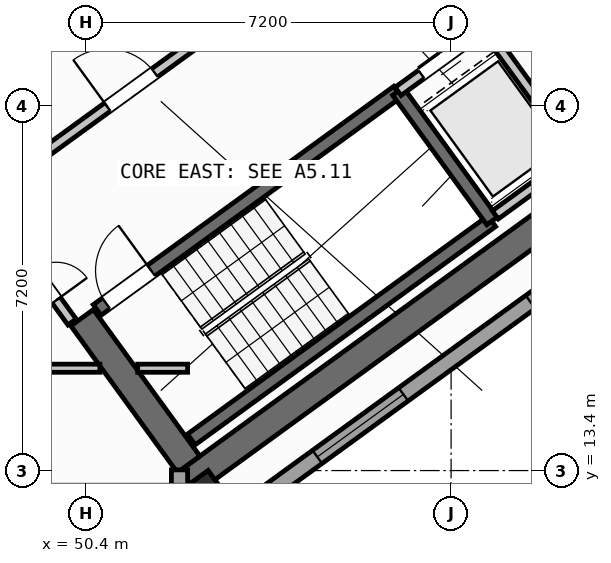
"""IFC4 building model, lengths in metres.
Left out: names, types, materials, properties, quantities, classifications, styles, units other than length and angle.
Written with IfcOpenShell. Run it as: python <this file> out.ifc"""

import sys

from ifc_helpers import new_model, si_unit, direction, frame, frame_2d, origin, origin_2d, place, context, subcontext, project, spatial, rectangle, hollow_rectangle, extrude, source, transform, mapped, element, fill, save


model = new_model("IFC4")
c1 = context("Model", 3, precision=1e-05, world=origin(), true_north=direction((0.0, 1.0)))
c2 = subcontext(c1, "Body", "Model", "MODEL_VIEW")
j1 = project(units=[si_unit("LENGTHUNIT", "METRE"), si_unit("PLANEANGLEUNIT", "RADIAN")], contexts=[c1])
p1 = place(None, origin())
s1 = spatial("IfcSite", under=j1, at=p1, CompositionType="ELEMENT")
p2 = place(p1, origin())
s2 = spatial("IfcBuilding", under=s1, at=p2, CompositionType="ELEMENT")
p3 = place(p2, frame((0.0, 0.0, 108.9)))
s3 = spatial("IfcBuildingStorey", under=s2, at=p3, CompositionType="ELEMENT", Elevation=108.9)
p4 = place(p3, frame((52.359, 13.14, 0.0), z_axis=(0.0, 0.0, 1.0), x_axis=(0.809014896919, 0.587788139183, 0.0)))
e1 = element("IfcWall", 1, at=p4, inside=s3, PredefinedType="SHEAR", context=c2, shape_type="SweptSolid", body=[
    extrude(rectangle(XDim=12.34, YDim=0.55, at=frame_2d((6.17, 0.0))), origin(), (0.0, 0.0, 1.0), 3.35),
])
p5 = place(p3, frame((52.42, 13.524, 0.0), z_axis=(0.0, 0.0, 1.0), x_axis=(-0.587802113096, 0.809004744015, 0.0)))
e2 = element("IfcWall", 2, at=p5, inside=s3, PredefinedType="SHEAR", context=c2, shape_type="SweptSolid", body=[
    extrude(rectangle(XDim=3.575, YDim=0.55, at=frame_2d((1.788, 0.0))), origin(), (0.0, 0.0, 1.0), 3.35),
])
m1 = source(origin(), c2, "Body", "SweptSolid", [
    extrude(hollow_rectangle(XDim=0.9, YDim=0.9, WallThickness=0.036, at=origin_2d()), origin(), (0.0, 0.0, 1.0), 3.6),
])
p6 = place(p3, frame((52.705, 12.773, 0.0), z_axis=(0.0, 0.0, 1.0), x_axis=(0.809016994375, 0.587785252292, 0.0)))
e3 = element("IfcColumn", 3, at=p6, inside=s3, PredefinedType="COLUMN", context=c2, shape_type="MappedRepresentation", body=[
    mapped(m1, transform((0.0, 0.0, 0.0), scale=1.0)),
])
p7 = place(p3, frame((67.454, 22.747, 0.0), z_axis=(0.0, 0.0, 1.0), x_axis=(-0.809021120468, -0.587779573171, 0.0)))
e4 = element("IfcWall", 4, at=p7, inside=s3, PredefinedType="STANDARD", context=c2, shape_type="SweptSolid", body=[
    extrude(rectangle(XDim=17.588, YDim=0.32, at=frame_2d((8.794, 0.0))), origin(), (0.0, 0.0, 1.0), 3.35),
])
p8 = place(p7, frame((1.624, 0.0, 0.0)))
e5 = element("IfcOpeningElement", 5, at=p8, cuts=e4, PredefinedType="OPENING", context=c2, shape_type="SweptSolid", body=[
    extrude(rectangle(XDim=1.05, YDim=2.15, at=frame_2d((0.525, 1.075))), frame((0.0, 0.17, 0.0), z_axis=(0.0, -1.0, 0.0), x_axis=(1.0, 0.0, 0.0)), (0.0, 0.0, 1.0), 0.34),
])
p9 = place(p7, frame((8.144, 0.0, 0.8)))
e6 = element("IfcOpeningElement", 6, at=p9, cuts=e4, PredefinedType="OPENING", context=c2, shape_type="SweptSolid", body=[
    extrude(rectangle(XDim=2.1, YDim=1.55, at=frame_2d((1.05, 0.775))), frame((0.0, 0.17, 0.0), z_axis=(0.0, -1.0, 0.0), x_axis=(1.0, 0.0, 0.0)), (0.0, 0.0, 1.0), 0.34),
])
p10 = place(p7, frame((13.344, 0.0, 0.8)))
e7 = element("IfcOpeningElement", 7, at=p10, cuts=e4, PredefinedType="OPENING", context=c2, shape_type="SweptSolid", body=[
    extrude(rectangle(XDim=2.1, YDim=1.55, at=frame_2d((1.05, 0.775))), frame((0.0, 0.17, 0.0), z_axis=(0.0, -1.0, 0.0), x_axis=(1.0, 0.0, 0.0)), (0.0, 0.0, 1.0), 0.34),
])
p11 = place(p3, frame((52.24, 13.414, 0.0), z_axis=(0.0, 0.0, 1.0), x_axis=(0.0, -1.0, 0.0)))
e8 = element("IfcWall", 8, at=p11, inside=s3, PredefinedType="STANDARD", context=c2, shape_type="SweptSolid", body=[
    extrude(rectangle(XDim=9.948, YDim=0.32, at=frame_2d((4.974, 0.0))), origin(), (0.0, 0.0, 1.0), 3.35),
])
p12 = place(p11, frame((2.31, 0.0, 0.8)))
e9 = element("IfcOpeningElement", 9, at=p12, cuts=e8, PredefinedType="OPENING", context=c2, shape_type="SweptSolid", body=[
    extrude(rectangle(XDim=2.1, YDim=1.55, at=frame_2d((1.05, 0.775))), frame((0.0, 0.17, 0.0), z_axis=(0.0, -1.0, 0.0), x_axis=(1.0, 0.0, 0.0)), (0.0, 0.0, 1.0), 0.34),
])
p13 = place(p11, frame((7.033, 0.0, 0.85)))
e10 = element("IfcOpeningElement", 10, at=p13, cuts=e8, PredefinedType="OPENING", context=c2, shape_type="SweptSolid", body=[
    extrude(rectangle(XDim=1.8, YDim=1.5, at=frame_2d((0.9, 0.75))), frame((0.0, 0.17, 0.0), z_axis=(0.0, -1.0, 0.0), x_axis=(1.0, 0.0, 0.0)), (0.0, 0.0, 1.0), 0.34),
])
p14 = place(p3, frame((52.472, 14.013, 0.0), z_axis=(0.0, 0.0, 1.0), x_axis=(0.809028366311, 0.587769599847, 0.0)))
e11 = element("IfcWall", 11, at=p14, inside=s3, PredefinedType="SHEAR", context=c2, shape_type="SweptSolid", body=[
    extrude(rectangle(XDim=7.33, YDim=0.26, at=frame_2d((3.665, 0.0))), origin(), (0.0, 0.0, 1.0), 3.35),
])
p15 = place(p3, frame((50.615, 16.57, 0.0), z_axis=(0.0, 0.0, 1.0), x_axis=(0.809028366311, 0.587769599847, 0.0)))
e12 = element("IfcWall", 12, at=p15, inside=s3, PredefinedType="SHEAR", context=c2, shape_type="SweptSolid", body=[
    extrude(rectangle(XDim=7.33, YDim=0.26, at=frame_2d((3.665, 0.0))), origin(), (0.0, 0.0, 1.0), 3.35),
])
p16 = place(p15, frame((0.22, 0.0, 0.0)))
e13 = element("IfcOpeningElement", 13, at=p16, cuts=e12, PredefinedType="OPENING", context=c2, shape_type="SweptSolid", body=[
    extrude(rectangle(XDim=1.1, YDim=2.1, at=frame_2d((0.55, 1.05))), frame((0.0, 0.14, 0.0), z_axis=(0.0, -1.0, 0.0), x_axis=(1.0, 0.0, 0.0)), (0.0, 0.0, 1.0), 0.28),
])
p17 = place(p3, frame((58.41, 18.327, 0.0), z_axis=(0.0, 0.0, 1.0), x_axis=(-0.58776738483, 0.809029975545, 0.0)))
e14 = element("IfcWall", 14, at=p17, inside=s3, PredefinedType="SHEAR", context=c2, shape_type="SweptSolid", body=[
    extrude(rectangle(XDim=3.16, YDim=0.26, at=frame_2d((1.58, 0.0))), origin(), (0.0, 0.0, 1.0), 3.35),
])
p18 = place(p3, frame((47.065, 21.407, 0.0), z_axis=(0.0, 0.0, 1.0), x_axis=(0.809032984992, 0.587763242466, 0.0)))
e15 = element("IfcWall", 15, at=p18, inside=s3, PredefinedType="STANDARD", context=c2, shape_type="SweptSolid", body=[
    extrude(rectangle(XDim=3.448, YDim=0.2, at=frame_2d((1.724, 0.0))), origin(), (0.0, 0.0, 1.0), 3.34),
])
p19 = place(p18, frame((0.458, 0.0, 0.0)))
e16 = element("IfcOpeningElement", 16, at=p19, cuts=e15, PredefinedType="OPENING", context=c2, shape_type="SweptSolid", body=[
    extrude(rectangle(XDim=1.3, YDim=2.2, at=frame_2d((0.65, 1.1))), frame((0.0, 0.11, 0.0), z_axis=(0.0, -1.0, 0.0), x_axis=(1.0, 0.0, 0.0)), (0.0, 0.0, 1.0), 0.22),
])
p20 = place(p3, frame((48.758, 19.077, 0.0), z_axis=(0.0, 0.0, 1.0), x_axis=(0.809005065155, 0.587801671104, 0.0)))
e17 = element("IfcWall", 17, at=p20, inside=s3, PredefinedType="STANDARD", context=c2, shape_type="SweptSolid", body=[
    extrude(rectangle(XDim=5.768, YDim=0.2, at=frame_2d((2.884, 0.0))), origin(), (0.0, 0.0, 1.0), 3.34),
])
p21 = place(p20, frame((2.548, 0.0, 0.0)))
e18 = element("IfcOpeningElement", 18, at=p21, cuts=e17, PredefinedType="OPENING", context=c2, shape_type="SweptSolid", body=[
    extrude(rectangle(XDim=1.15, YDim=2.1, at=frame_2d((0.575, 1.05))), frame((0.0, 0.11, 0.0), z_axis=(0.0, -1.0, 0.0), x_axis=(1.0, 0.0, 0.0)), (0.0, 0.0, 1.0), 0.22),
])
p22 = place(p3, frame((56.553, 20.884, 0.0), z_axis=(0.0, 0.0, 1.0), x_axis=(0.809023564264, 0.58777620951, 0.0)))
e19 = element("IfcWall", 19, at=p22, inside=s3, PredefinedType="STANDARD", context=c2, shape_type="SweptSolid", body=[
    extrude(rectangle(XDim=3.818, YDim=0.2, at=frame_2d((1.909, 0.0))), origin(), (0.0, 0.0, 1.0), 3.34),
])
p23 = place(p22, frame((0.57, 0.0, 0.0)))
e20 = element("IfcOpeningElement", 20, at=p23, cuts=e19, PredefinedType="OPENING", context=c2, shape_type="SweptSolid", body=[
    extrude(rectangle(XDim=1.1, YDim=2.15, at=frame_2d((0.55, 1.075))), frame((0.0, 0.11, 0.0), z_axis=(0.0, -1.0, 0.0), x_axis=(1.0, 0.0, 0.0)), (0.0, 0.0, 1.0), 0.22),
])
p24 = place(p22, frame((2.65, 0.0, 0.0)))
e21 = element("IfcOpeningElement", 21, at=p24, cuts=e19, PredefinedType="OPENING", context=c2, shape_type="SweptSolid", body=[
    extrude(rectangle(XDim=0.86, YDim=2.05, at=frame_2d((0.43, 1.025))), frame((0.0, 0.11, 0.0), z_axis=(0.0, -1.0, 0.0), x_axis=(1.0, 0.0, 0.0)), (0.0, 0.0, 1.0), 0.22),
])
p25 = place(p3, frame((60.067, 19.655, 0.0), z_axis=(0.0, 0.0, 1.0), x_axis=(-0.587800520745, 0.809005900975, 0.0)))
e22 = element("IfcWall", 22, at=p25, inside=s3, PredefinedType="STANDARD", context=c2, shape_type="SweptSolid", body=[
    extrude(rectangle(XDim=2.66, YDim=0.2, at=frame_2d((1.33, 0.0))), origin(), (0.0, 0.0, 1.0), 3.34),
])
p26 = place(p3, frame((58.472, 18.447, 0.0), z_axis=(0.0, 0.0, 1.0), x_axis=(0.809018631237, 0.587782999339, 0.0)))
e23 = element("IfcWall", 23, at=p26, inside=s3, PredefinedType="STANDARD", context=c2, shape_type="SweptSolid", body=[
    extrude(rectangle(XDim=3.698, YDim=0.2, at=frame_2d((1.849, 0.0))), origin(), (0.0, 0.0, 1.0), 3.34),
])
p27 = place(p3, frame((35.237, 15.42, 0.0), z_axis=(0.0, 0.0, 1.0), x_axis=(1.0, 0.0, 0.0)))
e24 = element("IfcWall", 24, at=p27, inside=s3, PredefinedType="PARTITIONING", context=c2, shape_type="SweptSolid", body=[
    extrude(rectangle(XDim=15.432, YDim=0.16, at=frame_2d((7.716, 0.0))), origin(), (0.0, 0.0, 1.0), 3.34),
])
p28 = place(p27, frame((0.969, 0.0, 0.0)))
e25 = element("IfcOpeningElement", 25, at=p28, cuts=e24, PredefinedType="OPENING", context=c2, shape_type="SweptSolid", body=[
    extrude(rectangle(XDim=1.0, YDim=2.1, at=frame_2d((0.5, 1.05))), frame((0.0, 0.09, 0.0), z_axis=(0.0, -1.0, 0.0), x_axis=(1.0, 0.0, 0.0)), (0.0, 0.0, 1.0), 0.18),
])
p29 = place(p27, frame((8.799, 0.0, 0.0)))
e26 = element("IfcOpeningElement", 26, at=p29, cuts=e24, PredefinedType="OPENING", context=c2, shape_type="SweptSolid", body=[
    extrude(rectangle(XDim=1.0, YDim=2.1, at=frame_2d((0.5, 1.05))), frame((0.0, 0.09, 0.0), z_axis=(0.0, -1.0, 0.0), x_axis=(1.0, 0.0, 0.0)), (0.0, 0.0, 1.0), 0.18),
])
p30 = place(p3, frame((51.416, 15.42, 0.0), z_axis=(0.0, 0.0, 1.0), x_axis=(1.0, 0.0, 0.0)))
e27 = element("IfcWall", 27, at=p30, inside=s3, PredefinedType="PARTITIONING", context=c2, shape_type="SweptSolid", body=[
    extrude(rectangle(XDim=0.984, YDim=0.16, at=frame_2d((0.492, 0.0))), origin(), (0.0, 0.0, 1.0), 3.34),
])
p31 = place(p3, frame((50.119, 16.333, 0.0), z_axis=(0.0, 0.0, 1.0), x_axis=(-0.587749856981, 0.809042709391, 0.0)))
e28 = element("IfcWall", 28, at=p31, inside=s3, PredefinedType="STANDARD", context=c2, shape_type="SweptSolid", body=[
    extrude(rectangle(XDim=2.96, YDim=0.2, at=frame_2d((1.48, 0.0))), origin(), (0.0, 0.0, 1.0), 3.34),
])
p32 = place(p31, frame((0.53, 0.0, 0.0)))
e29 = element("IfcOpeningElement", 29, at=p32, cuts=e28, PredefinedType="OPENING", context=c2, shape_type="SweptSolid", body=[
    extrude(rectangle(XDim=1.5, YDim=2.15, at=frame_2d((0.75, 1.075))), frame((0.0, 0.11, 0.0), z_axis=(0.0, -1.0, 0.0), x_axis=(1.0, 0.0, 0.0)), (0.0, 0.0, 1.0), 0.22),
])
m2 = source(origin(), c2, "Body", "SweptSolid", [
    extrude(rectangle(XDim=2.1, YDim=1.55, at=frame_2d((1.05, 0.775))), frame((0.0, 0.03, 0.0), z_axis=(0.0, -1.0, 0.0), x_axis=(1.0, 0.0, 0.0)), (0.0, 0.0, 1.0), 0.06),
])
p33 = place(p9, origin())
e30 = element("IfcWindow", 30, at=p33, inside=s3, PartitioningType="SINGLE_PANEL", PredefinedType="WINDOW", context=c2, shape_type="MappedRepresentation", body=[
    mapped(m2, transform((0.0, 0.0, 0.0), scale=1.0)),
])
fill(e6, e30)
p34 = place(p10, origin())
e31 = element("IfcWindow", 31, at=p34, inside=s3, PartitioningType="SINGLE_PANEL", PredefinedType="WINDOW", context=c2, shape_type="MappedRepresentation", body=[
    mapped(m2, transform((0.0, 0.0, 0.0), scale=1.0)),
])
fill(e7, e31)
m3 = source(origin(), c2, "Body", "SweptSolid", [
    extrude(rectangle(XDim=1.1, YDim=2.1, at=frame_2d((0.55, 1.05))), frame((0.0, 0.025, 0.0), z_axis=(0.0, -1.0, 0.0), x_axis=(1.0, 0.0, 0.0)), (0.0, 0.0, 1.0), 0.05),
])
p35 = place(p16, origin())
e32 = element("IfcDoor", 32, at=p35, inside=s3, OperationType="SINGLE_SWING_RIGHT", PredefinedType="DOOR", context=c2, shape_type="MappedRepresentation", body=[
    mapped(m3, transform((0.0, 0.0, 0.0), scale=1.0)),
])
fill(e13, e32)
m4 = source(origin(), c2, "Body", "SweptSolid", [
    extrude(rectangle(XDim=1.15, YDim=2.1, at=frame_2d((0.575, 1.05))), frame((0.0, 0.025, 0.0), z_axis=(0.0, -1.0, 0.0), x_axis=(1.0, 0.0, 0.0)), (0.0, 0.0, 1.0), 0.05),
])
p36 = place(p21, origin())
e33 = element("IfcDoor", 33, at=p36, inside=s3, OperationType="SINGLE_SWING_LEFT", PredefinedType="DOOR", context=c2, shape_type="MappedRepresentation", body=[
    mapped(m4, transform((0.0, 0.0, 0.0), scale=1.0)),
])
fill(e18, e33)
m5 = source(origin(), c2, "Body", "SweptSolid", [
    extrude(rectangle(XDim=1.1, YDim=2.15, at=frame_2d((0.55, 1.075))), frame((0.0, 0.025, 0.0), z_axis=(0.0, -1.0, 0.0), x_axis=(1.0, 0.0, 0.0)), (0.0, 0.0, 1.0), 0.05),
])
p37 = place(p23, origin())
e34 = element("IfcDoor", 34, at=p37, inside=s3, OperationType="DOUBLE_DOOR_SLIDING", PredefinedType="DOOR", context=c2, shape_type="MappedRepresentation", body=[
    mapped(m5, transform((0.0, 0.0, 0.0), scale=1.0)),
])
fill(e20, e34)
m6 = source(origin(), c2, "Body", "SweptSolid", [
    extrude(rectangle(XDim=1.5, YDim=2.15, at=frame_2d((0.75, 1.075))), frame((0.0, 0.025, 0.0), z_axis=(0.0, -1.0, 0.0), x_axis=(1.0, 0.0, 0.0)), (0.0, 0.0, 1.0), 0.05),
])
p38 = place(p32, frame((1.5, 0.0, 0.0), z_axis=(0.0, 0.0, 1.0), x_axis=(-1.0, 0.0, 0.0)))
e35 = element("IfcDoor", 35, at=p38, inside=s3, OperationType="DOUBLE_DOOR_SINGLE_SWING", PredefinedType="DOOR", context=c2, shape_type="MappedRepresentation", body=[
    mapped(m6, transform((0.0, 0.0, 0.0), scale=1.0)),
])
fill(e29, e35)
save(model, sys.argv[1])
